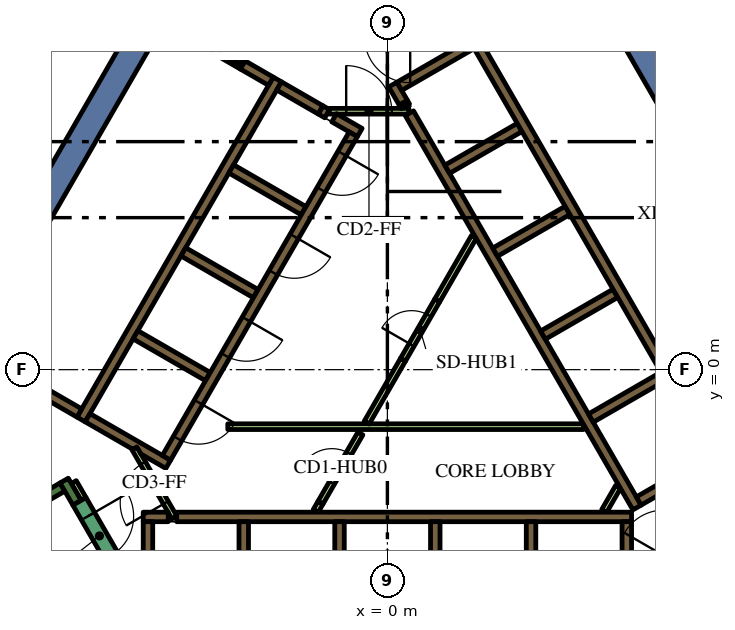
"""IFC4 building model, lengths in metres.
Left out: names, types, materials, properties, quantities, classifications, styles, units other than length and angle.
Written with IfcOpenShell. Run it as: python <this file> out.ifc"""

import sys

from ifc_helpers import new_model, si_unit, direction, frame, frame_2d, origin, place, context, subcontext, project, spatial, polyline, rectangle, outline, extrude, element, fill, save


model = new_model("IFC4")
c1 = context("Model", 3, precision=1e-05, world=origin(), true_north=direction((0.0, 1.0)))
c2 = subcontext(c1, "Body", "Model", "MODEL_VIEW")
j1 = project(units=[si_unit("LENGTHUNIT", "METRE"), si_unit("PLANEANGLEUNIT", "RADIAN")], contexts=[c1])
p1 = place(None, origin())
s1 = spatial("IfcSite", under=j1, at=p1, CompositionType="ELEMENT")
p2 = place(p1, origin())
s2 = spatial("IfcBuilding", under=s1, at=p2, CompositionType="ELEMENT")
p3 = place(p2, frame((0.0, 0.0, 252.0)))
s3 = spatial("IfcBuildingStorey", under=s2, at=p3, CompositionType="ELEMENT", Elevation=252.0)
p4 = place(p3, frame((8.235, 5.736, 0.0), z_axis=(0.0, 0.0, 1.0), x_axis=(-0.499983401189, 0.8660349869, 0.0)))
e1 = element("IfcWall", 1, at=p4, inside=s3, PredefinedType="SOLIDWALL", context=c2, shape_type="SweptSolid", body=[
    extrude(rectangle(XDim=12.472, YDim=0.7, at=frame_2d((6.236, 0.0))), origin(), (0.0, 0.0, 1.0), 4.2),
])
p5 = place(p3, frame((-12.625, -1.867, 0.0), z_axis=(0.0, 0.0, 1.0), x_axis=(0.499996974394, 0.866027150612, 0.0)))
e2 = element("IfcWall", 2, at=p5, inside=s3, PredefinedType="SOLIDWALL", context=c2, shape_type="SweptSolid", body=[
    extrude(rectangle(XDim=15.858, YDim=0.7, at=frame_2d((7.929, 0.0))), origin(), (0.0, 0.0, 1.0), 4.2),
])
p6 = place(p3, frame((-14.44, -6.49, 0.0), z_axis=(0.0, 0.0, 1.0), x_axis=(0.866022966069, 0.500004222222, 0.0)))
e3 = element("IfcWall", 3, at=p6, inside=s3, PredefinedType="SOLIDWALL", context=c2, shape_type="SweptSolid", body=[
    extrude(rectangle(XDim=6.8, YDim=0.25, at=frame_2d((3.4, 0.0))), origin(), (0.0, 0.0, 1.0), 4.2),
])
p7 = place(p3, frame((-8.168, -3.503, 0.0), z_axis=(0.0, 0.0, 1.0), x_axis=(-0.499952099219, 0.866053057547, 0.0)))
e4 = element("IfcWall", 4, at=p7, inside=s3, PredefinedType="SOLIDWALL", context=c2, shape_type="SweptSolid", body=[
    extrude(rectangle(XDim=0.675, YDim=0.25, at=frame_2d((0.337, 0.0))), origin(), (0.0, 0.0, 1.0), 4.2),
])
p8 = place(p3, frame((-5.545, -3.875, 0.0), z_axis=(0.0, 0.0, 1.0), x_axis=(1.0, 0.0, 0.0)))
e5 = element("IfcWall", 5, at=p8, inside=s3, PredefinedType="SOLIDWALL", context=c2, shape_type="SweptSolid", body=[
    extrude(rectangle(XDim=11.97, YDim=0.25, at=frame_2d((5.985, 0.0))), origin(), (0.0, 0.0, 1.0), 4.2),
])
p9 = place(p3, frame((-6.425, -3.875, 0.0), z_axis=(0.0, 0.0, 1.0), x_axis=(1.0, 0.0, 0.0)))
e6 = element("IfcWall", 6, at=p9, inside=s3, PredefinedType="SOLIDWALL", context=c2, shape_type="SweptSolid", body=[
    extrude(rectangle(XDim=0.658, YDim=0.25, at=frame_2d((0.329, 0.0))), origin(), (0.0, 0.0, 1.0), 4.2),
])
p10 = place(p3, frame((6.3, -7.24, 0.0), z_axis=(0.0, 0.0, 1.0), x_axis=(0.0, 1.0, 0.0)))
e7 = element("IfcWall", 7, at=p10, inside=s3, PredefinedType="SOLIDWALL", context=c2, shape_type="SweptSolid", body=[
    extrude(rectangle(XDim=3.24, YDim=0.25, at=frame_2d((1.62, 0.0))), origin(), (0.0, 0.0, 1.0), 4.2),
])
for number, where, z_axis, x_axis in (
    (8, (3.78, -4.0, 0.0), (0.0, 0.0, 1.0), (0.0, -1.0, 0.0)),
    (9, (1.26, -4.0, 0.0), (0.0, 0.0, 1.0), (0.0, -1.0, 0.0)),
    (10, (-1.26, -4.0, 0.0), (0.0, 0.0, 1.0), (0.0, -1.0, 0.0)),
    (11, (-3.78, -4.0, 0.0), (0.0, 0.0, 1.0), (0.0, -1.0, 0.0)),
):
    element("IfcWall", number, at=place(p3, frame(where, z_axis=z_axis, x_axis=x_axis)), inside=s3, PredefinedType="SOLIDWALL", context=c2, shape_type="SweptSolid", body=[
        extrude(rectangle(XDim=2.2, YDim=0.25, at=frame_2d((1.1, 0.0))), origin(), (0.0, 0.0, 1.0), 4.2),
    ])
p11 = place(p3, frame((-6.3, -7.125, 0.0), z_axis=(0.0, 0.0, 1.0), x_axis=(0.0, 1.0, 0.0)))
e12 = element("IfcWall", 12, at=p11, inside=s3, PredefinedType="SOLIDWALL", context=c2, shape_type="SweptSolid", body=[
    extrude(rectangle(XDim=3.125, YDim=0.25, at=frame_2d((1.562, 0.0))), origin(), (0.0, 0.0, 1.0), 4.2),
])
p12 = place(p3, frame((0.473, 6.93, 0.0), z_axis=(0.0, 0.0, 1.0), x_axis=(-0.49972245349, 0.866185586049, 0.0)))
e13 = element("IfcWall", 13, at=p12, inside=s3, PredefinedType="SOLIDWALL", context=c2, shape_type="SweptSolid", body=[
    extrude(rectangle(XDim=0.11, YDim=0.25, at=frame_2d((0.055, 0.0))), origin(), (0.0, 0.0, 1.0), 4.2),
])
p13 = place(p3, frame((6.568, -3.627, 0.0), z_axis=(0.0, 0.0, 1.0), x_axis=(-0.499999455981, 0.866025717874, 0.0)))
e14 = element("IfcWall", 14, at=p13, inside=s3, PredefinedType="SOLIDWALL", context=c2, shape_type="SweptSolid", body=[
    extrude(rectangle(XDim=11.978, YDim=0.25, at=frame_2d((5.989, 0.0))), origin(), (0.0, 0.0, 1.0), 4.2),
])
p14 = place(p3, frame((0.417, 7.027, 0.0), z_axis=(0.0, 0.0, 1.0), x_axis=(-0.500210807569, 0.865903659763, 0.0)))
e15 = element("IfcWall", 15, at=p14, inside=s3, PredefinedType="SOLIDWALL", context=c2, shape_type="SweptSolid", body=[
    extrude(rectangle(XDim=0.548, YDim=0.25, at=frame_2d((0.274, 0.0))), origin(), (0.0, 0.0, 1.0), 4.2),
])
p15 = place(p3, frame((3.1, 9.064, 0.0), z_axis=(0.0, 0.0, 1.0), x_axis=(-0.866030133475, -0.499991807846, 0.0)))
e16 = element("IfcWall", 16, at=p15, inside=s3, PredefinedType="SOLIDWALL", context=c2, shape_type="SweptSolid", body=[
    extrude(rectangle(XDim=3.217, YDim=0.25, at=frame_2d((1.608, 0.0))), origin(), (0.0, 0.0, 1.0), 4.2),
])
p16 = place(p3, frame((1.574, 5.274, 0.0), z_axis=(0.0, 0.0, 1.0), x_axis=(0.866028486751, 0.499994660107, 0.0)))
e17 = element("IfcWall", 17, at=p16, inside=s3, PredefinedType="SOLIDWALL", context=c2, shape_type="SweptSolid", body=[
    extrude(rectangle(XDim=2.2, YDim=0.25, at=frame_2d((1.1, 0.0))), origin(), (0.0, 0.0, 1.0), 4.2),
])
for number, where, z_axis, x_axis in (
    (18, (2.834, 3.091, 0.0), (0.0, 0.0, 1.0), (0.866, 0.5, 0.0)),
    (19, (4.094, 0.909, 0.0), (0.0, 0.0, 1.0), (0.866, 0.5, 0.0)),
    (20, (5.354, -1.274, 0.0), (0.0, 0.0, 1.0), (0.866, 0.5, 0.0)),
):
    element("IfcWall", number, at=place(p3, frame(where, z_axis=z_axis, x_axis=x_axis)), inside=s3, PredefinedType="SOLIDWALL", context=c2, shape_type="SweptSolid", body=[
        extrude(rectangle(XDim=2.2, YDim=0.25, at=frame_2d((1.1, 0.0))), origin(), (0.0, 0.0, 1.0), 4.2),
    ])
p17 = place(p3, frame((6.614, -3.456, 0.0), z_axis=(0.0, 0.0, 1.0), x_axis=(0.866025089694, 0.500000544019, 0.0)))
e21 = element("IfcWall", 21, at=p17, inside=s3, PredefinedType="SOLIDWALL", context=c2, shape_type="SweptSolid", body=[
    extrude(rectangle(XDim=2.305, YDim=0.25, at=frame_2d((1.153, 0.0))), origin(), (0.0, 0.0, 1.0), 4.2),
])
p18 = place(p3, frame((-8.06, -1.311, 0.0), z_axis=(0.0, 0.0, 1.0), x_axis=(0.50000273126, 0.866023826885, 0.0)))
e22 = element("IfcWall", 22, at=p18, inside=s3, PredefinedType="SOLIDWALL", context=c2, shape_type="SweptSolid", body=[
    extrude(rectangle(XDim=10.33, YDim=0.25, at=frame_2d((5.165, 0.0))), origin(), (0.0, 0.0, 1.0), 4.2),
])
p19 = place(p3, frame((-1.758, 6.835, 0.0), z_axis=(0.0, 0.0, 1.0), x_axis=(0.865982457891, -0.500074377092, 0.0)))
e23 = element("IfcWall", 23, at=p19, inside=s3, PredefinedType="SOLIDWALL", context=c2, shape_type="SweptSolid", body=[
    extrude(rectangle(XDim=0.2, YDim=0.25, at=frame_2d((0.1, 0.0))), origin(), (0.0, 0.0, 1.0), 4.2),
])
p20 = place(p3, frame((-1.76, 6.836, 0.0), z_axis=(0.0, 0.0, 1.0), x_axis=(-0.865952863304, 0.500125622755, 0.0)))
e24 = element("IfcWall", 24, at=p20, inside=s3, PredefinedType="SOLIDWALL", context=c2, shape_type="SweptSolid", body=[
    extrude(rectangle(XDim=1.258, YDim=0.25, at=frame_2d((0.629, 0.0))), origin(), (0.0, 0.0, 1.0), 4.2),
])
p21 = place(p3, frame((-0.728, 6.24, 0.0), z_axis=(0.0, 0.0, 1.0), x_axis=(-0.865955664968, 0.500120771724, 0.0)))
e25 = element("IfcWall", 25, at=p21, inside=s3, PredefinedType="SOLIDWALL", context=c2, shape_type="SweptSolid", body=[
    extrude(rectangle(XDim=0.778, YDim=0.25, at=frame_2d((0.389, 0.0))), origin(), (0.0, 0.0, 1.0), 4.2),
])
for number, where, z_axis, x_axis in (
    (26, (-2.204, 4.182, 0.0), (0.0, 0.0, 1.0), (-0.866, 0.5, 0.0)),
    (27, (-5.369, 3.1, 0.0), (0.0, 0.0, 1.0), (0.866, -0.5, 0.0)),
    (28, (-4.724, -0.182, 0.0), (0.0, 0.0, 1.0), (-0.866, 0.5, 0.0)),
):
    element("IfcWall", number, at=place(p3, frame(where, z_axis=z_axis, x_axis=x_axis)), inside=s3, PredefinedType="SOLIDWALL", context=c2, shape_type="SweptSolid", body=[
        extrude(rectangle(XDim=2.2, YDim=0.25, at=frame_2d((1.1, 0.0))), origin(), (0.0, 0.0, 1.0), 4.2),
    ])
p22 = place(p3, origin())
e29 = element("IfcWall", 29, at=p22, inside=s3, PredefinedType="SOLIDWALL", context=c2, shape_type="SweptSolid", body=[
    extrude(outline(polyline([(-5.922, -2.257), (-5.922, -2.257), (-5.705, -2.382), (-5.83, -2.598), (-6.483, -2.221), (-6.591, -2.033), (-6.591, -2.033), (-6.7, -2.096), (-7.952, -1.373), (-7.827, -1.156), (-5.922, -2.257)])), origin(), (0.0, 0.0, 1.0), 4.2),
])
p23 = place(p3, frame((-8.106, -1.14, 0.0), z_axis=(0.0, 0.0, 1.0), x_axis=(-0.866008981251, 0.500028443584, 0.0)))
e30 = element("IfcWall", 30, at=p23, inside=s3, PredefinedType="SOLIDWALL", context=c2, shape_type="SweptSolid", body=[
    extrude(rectangle(XDim=3.2, YDim=0.25, at=frame_2d((1.6, 0.0))), origin(), (0.0, 0.0, 1.0), 4.2),
])
p24 = place(p3, frame((-3.066, 7.59, 0.0), z_axis=(0.0, 0.0, 1.0), x_axis=(-0.866081358704, 0.49990307071, 0.0)))
e31 = element("IfcWall", 31, at=p24, inside=s3, PredefinedType="SOLIDWALL", context=c2, shape_type="SweptSolid", body=[
    extrude(rectangle(XDim=0.858, YDim=0.25, at=frame_2d((0.429, 0.0))), origin(), (0.0, 0.0, 1.0), 4.2),
])
e32 = element("IfcWall", 32, at=p22, inside=s3, PredefinedType="SOLIDWALL", context=c2, shape_type="SweptSolid", body=[
    extrude(outline(polyline([(-3.748, 8.128), (-3.813, 8.015), (-4.027, 8.139), (-4.017, 8.156), (-4.008, 8.173), (-4.0, 8.192), (-3.995, 8.21), (-3.991, 8.23), (-3.99, 8.25), (-3.99, 8.268), (-3.748, 8.128)])), origin(), (0.0, 0.0, 1.0), 4.2),
])
p25 = place(p3, frame((-8.252, -2.958, 0.0), z_axis=(0.0, 0.0, 1.0), x_axis=(0.500174715838, -0.865924508047, 0.0)))
e33 = element("IfcWall", 33, at=p25, inside=s3, PredefinedType="PARTITIONING", context=c2, shape_type="SweptSolid", body=[
    extrude(rectangle(XDim=0.514, YDim=0.15, at=frame_2d((0.257, 0.0))), origin(), (0.0, 0.0, 1.0), 3.4),
])
p26 = place(p3, frame((5.705, -3.718, 0.0), z_axis=(0.0, 0.0, 1.0), x_axis=(0.499962090823, 0.866047289552, 0.0)))
e34 = element("IfcWall", 34, at=p26, inside=s3, PredefinedType="PARTITIONING", context=c2, shape_type="SweptSolid", body=[
    extrude(rectangle(XDim=0.735, YDim=0.15, at=frame_2d((0.367, 0.0))), origin(), (0.0, 0.0, 1.0), 3.4),
])
p27 = place(p3, frame((-4.2, -1.5, 0.0), z_axis=(0.0, 0.0, 1.0), x_axis=(1.0, 0.0, 0.0)))
e35 = element("IfcWall", 35, at=p27, inside=s3, PredefinedType="PARTITIONING", context=c2, shape_type="SweptSolid", body=[
    extrude(rectangle(XDim=9.359, YDim=0.15, at=frame_2d((4.68, 0.0))), origin(), (0.0, 0.0, 1.0), 3.4),
])
p28 = place(p3, frame((-0.544, -1.393, 0.0), z_axis=(0.0, 0.0, 1.0), x_axis=(0.499928740635, 0.866066541489, 0.0)))
e36 = element("IfcWall", 36, at=p28, inside=s3, PredefinedType="PARTITIONING", context=c2, shape_type="SweptSolid", body=[
    extrude(rectangle(XDim=1.912, YDim=0.15, at=frame_2d((0.956, 0.0))), origin(), (0.0, 0.0, 1.0), 3.4),
])
p29 = place(p3, frame((1.312, 1.822, 0.0), z_axis=(0.0, 0.0, 1.0), x_axis=(0.500003549559, 0.866023354436, 0.0)))
e37 = element("IfcWall", 37, at=p29, inside=s3, PredefinedType="PARTITIONING", context=c2, shape_type="SweptSolid", body=[
    extrude(rectangle(XDim=1.93, YDim=0.15, at=frame_2d((0.965, 0.0))), origin(), (0.0, 0.0, 1.0), 3.4),
])
p30 = place(p3, frame((-1.887, -3.718, 0.0), z_axis=(0.0, 0.0, 1.0), x_axis=(0.500165633897, 0.865929753888, 0.0)))
e38 = element("IfcWall", 38, at=p30, inside=s3, PredefinedType="PARTITIONING", context=c2, shape_type="SweptSolid", body=[
    extrude(rectangle(XDim=0.254, YDim=0.15, at=frame_2d((0.127, 0.0))), origin(), (0.0, 0.0, 1.0), 3.4),
])
p31 = place(p3, frame((8.565, -2.185, 0.0), z_axis=(0.0, 0.0, 1.0), x_axis=(-0.499997954832, 0.866026584559, 0.0)))
e39 = element("IfcWall", 39, at=p31, inside=s3, PredefinedType="SOLIDWALL", context=c2, shape_type="SweptSolid", body=[
    extrude(rectangle(XDim=12.35, YDim=0.25, at=frame_2d((6.175, 0.0))), origin(), (0.0, 0.0, 1.0), 4.2),
])
p32 = place(p31, frame((0.585, 0.0, 0.0)))
e40 = element("IfcOpeningElement", 40, at=p32, cuts=e39, PredefinedType="OPENING", context=c2, shape_type="SweptSolid", body=[
    extrude(rectangle(XDim=1.1, YDim=2.1, at=frame_2d((0.55, 1.05))), frame((0.0, 0.135, 0.0), z_axis=(0.0, -1.0, 0.0), x_axis=(1.0, 0.0, 0.0)), (0.0, 0.0, 1.0), 0.27),
])
p33 = place(p3, frame((-0.898, 6.194, 0.0), z_axis=(0.0, 0.0, 1.0), x_axis=(-0.499996202215, -0.866027596426, 0.0)))
e41 = element("IfcWall", 41, at=p33, inside=s3, PredefinedType="SOLIDWALL", context=c2, shape_type="SweptSolid", body=[
    extrude(rectangle(XDim=9.83, YDim=0.25, at=frame_2d((4.915, 0.0))), origin(), (0.0, 0.0, 1.0), 4.2),
])
p34 = place(p33, frame((0.585, 0.0, 0.0)))
e42 = element("IfcOpeningElement", 42, at=p34, cuts=e41, PredefinedType="OPENING", context=c2, shape_type="SweptSolid", body=[
    extrude(rectangle(XDim=1.1, YDim=2.1, at=frame_2d((0.55, 1.05))), frame((0.0, 0.135, 0.0), z_axis=(0.0, -1.0, 0.0), x_axis=(1.0, 0.0, 0.0)), (0.0, 0.0, 1.0), 0.27),
])
p35 = place(p33, frame((3.105, 0.0, 0.0)))
e43 = element("IfcOpeningElement", 43, at=p35, cuts=e41, PredefinedType="OPENING", context=c2, shape_type="SweptSolid", body=[
    extrude(rectangle(XDim=1.1, YDim=2.1, at=frame_2d((0.55, 1.05))), frame((0.0, 0.135, 0.0), z_axis=(0.0, -1.0, 0.0), x_axis=(1.0, 0.0, 0.0)), (0.0, 0.0, 1.0), 0.27),
])
p36 = place(p33, frame((5.625, 0.0, 0.0)))
e44 = element("IfcOpeningElement", 44, at=p36, cuts=e41, PredefinedType="OPENING", context=c2, shape_type="SweptSolid", body=[
    extrude(rectangle(XDim=1.1, YDim=2.1, at=frame_2d((0.55, 1.05))), frame((0.0, 0.135, 0.0), z_axis=(0.0, -1.0, 0.0), x_axis=(1.0, 0.0, 0.0)), (0.0, 0.0, 1.0), 0.27),
])
p37 = place(p33, frame((8.145, 0.0, 0.0)))
e45 = element("IfcOpeningElement", 45, at=p37, cuts=e41, PredefinedType="OPENING", context=c2, shape_type="SweptSolid", body=[
    extrude(rectangle(XDim=1.1, YDim=2.1, at=frame_2d((0.55, 1.05))), frame((0.0, 0.135, 0.0), z_axis=(0.0, -1.0, 0.0), x_axis=(1.0, 0.0, 0.0)), (0.0, 0.0, 1.0), 0.27),
])
p38 = place(p3, frame((7.053, -5.284, 0.0), z_axis=(0.0, 0.0, 1.0), x_axis=(0.500078061341, 0.865980330357, 0.0)))
e46 = element("IfcWall", 46, at=p38, inside=s3, PredefinedType="SOLIDWALL", context=c2, shape_type="SweptSolid", body=[
    extrude(rectangle(XDim=2.1, YDim=0.4, at=frame_2d((1.05, 0.0))), origin(), (0.0, 0.0, 1.0), 4.2),
])
p39 = place(p38, frame((0.45, 0.0, 0.0)))
e47 = element("IfcOpeningElement", 47, at=p39, cuts=e46, PredefinedType="OPENING", context=c2, shape_type="SweptSolid", body=[
    extrude(rectangle(XDim=1.2, YDim=2.1, at=frame_2d((0.6, 1.05))), frame((0.0, 0.21, 0.0), z_axis=(0.0, -1.0, 0.0), x_axis=(1.0, 0.0, 0.0)), (0.0, 0.0, 1.0), 0.42),
])
p40 = place(p3, frame((-8.103, -3.466, 0.0), z_axis=(0.0, 0.0, 1.0), x_axis=(0.500078061341, -0.865980330357, 0.0)))
e48 = element("IfcWall", 48, at=p40, inside=s3, PredefinedType="SOLIDWALL", context=c2, shape_type="SweptSolid", body=[
    extrude(rectangle(XDim=2.1, YDim=0.4, at=frame_2d((1.05, 0.0))), origin(), (0.0, 0.0, 1.0), 4.2),
])
p41 = place(p40, frame((0.45, 0.0, 0.0)))
e49 = element("IfcOpeningElement", 49, at=p41, cuts=e48, PredefinedType="OPENING", context=c2, shape_type="SweptSolid", body=[
    extrude(rectangle(XDim=1.2, YDim=2.1, at=frame_2d((0.6, 1.05))), frame((0.0, 0.21, 0.0), z_axis=(0.0, -1.0, 0.0), x_axis=(1.0, 0.0, 0.0)), (0.0, 0.0, 1.0), 0.42),
])
p42 = place(p3, frame((-1.76, -3.498, 0.0), z_axis=(0.0, 0.0, 1.0), x_axis=(0.499977374825, 0.866038466041, 0.0)))
e50 = element("IfcWall", 50, at=p42, inside=s3, PredefinedType="PARTITIONING", context=c2, shape_type="SweptSolid", body=[
    extrude(rectangle(XDim=2.1, YDim=0.15, at=frame_2d((1.05, 0.0))), origin(), (0.0, 0.0, 1.0), 3.4),
])
p43 = place(p42, frame((0.6, 0.0, 0.0)))
e51 = element("IfcOpeningElement", 51, at=p43, cuts=e50, PredefinedType="OPENING", context=c2, shape_type="SweptSolid", body=[
    extrude(rectangle(XDim=0.9, YDim=2.1, at=frame_2d((0.45, 1.05))), frame((0.0, 0.085, 0.0), z_axis=(0.0, -1.0, 0.0), x_axis=(1.0, 0.0, 0.0)), (0.0, 0.0, 1.0), 0.17),
])
p44 = place(p3, frame((-1.534, 6.8, 0.0), z_axis=(0.0, 0.0, 1.0), x_axis=(1.0, 0.0, 0.0)))
e52 = element("IfcWall", 52, at=p44, inside=s3, PredefinedType="PARTITIONING", context=c2, shape_type="SweptSolid", body=[
    extrude(rectangle(XDim=2.1, YDim=0.15, at=frame_2d((1.05, 0.0))), origin(), (0.0, 0.0, 1.0), 3.4),
])
p45 = place(p44, frame((0.45, 0.0, 0.0)))
e53 = element("IfcOpeningElement", 53, at=p45, cuts=e52, PredefinedType="OPENING", context=c2, shape_type="SweptSolid", body=[
    extrude(rectangle(XDim=1.2, YDim=2.1, at=frame_2d((0.6, 1.05))), frame((0.0, 0.085, 0.0), z_axis=(0.0, -1.0, 0.0), x_axis=(1.0, 0.0, 0.0)), (0.0, 0.0, 1.0), 0.17),
])
p46 = place(p3, frame((-5.606, -3.89, 0.0), z_axis=(0.0, 0.0, 1.0), x_axis=(-0.500027713859, 0.866009402589, 0.0)))
e54 = element("IfcWall", 54, at=p46, inside=s3, PredefinedType="PARTITIONING", context=c2, shape_type="SweptSolid", body=[
    extrude(rectangle(XDim=2.1, YDim=0.15, at=frame_2d((1.05, 0.0))), origin(), (0.0, 0.0, 1.0), 3.4),
])
p47 = place(p46, frame((0.45, 0.0, 0.0)))
e55 = element("IfcOpeningElement", 55, at=p47, cuts=e54, PredefinedType="OPENING", context=c2, shape_type="SweptSolid", body=[
    extrude(rectangle(XDim=1.2, YDim=2.1, at=frame_2d((0.6, 1.05))), frame((0.0, 0.085, 0.0), z_axis=(0.0, -1.0, 0.0), x_axis=(1.0, 0.0, 0.0)), (0.0, 0.0, 1.0), 0.17),
])
p48 = place(p3, frame((-5.659, 9.012, 0.0), z_axis=(0.0, 0.0, 1.0), x_axis=(0.866009402589, -0.500027713859, 0.0)))
e56 = element("IfcWall", 56, at=p48, inside=s3, PredefinedType="PARTITIONING", context=c2, shape_type="SweptSolid", body=[
    extrude(rectangle(XDim=2.1, YDim=0.12, at=frame_2d((1.05, 0.0))), origin(), (0.0, 0.0, 1.0), 3.4),
])
p49 = place(p48, frame((0.45, 0.0, 0.0)))
e57 = element("IfcOpeningElement", 57, at=p49, cuts=e56, PredefinedType="OPENING", context=c2, shape_type="SweptSolid", body=[
    extrude(rectangle(XDim=1.2, YDim=2.1, at=frame_2d((0.6, 1.05))), frame((0.0, 0.07, 0.0), z_axis=(0.0, -1.0, 0.0), x_axis=(1.0, 0.0, 0.0)), (0.0, 0.0, 1.0), 0.14),
])
p50 = place(p3, frame((0.412, 0.263, 0.0), z_axis=(0.0, 0.0, 1.0), x_axis=(0.500062916607, 0.865989075817, 0.0)))
e58 = element("IfcWall", 58, at=p50, inside=s3, PredefinedType="PARTITIONING", context=c2, shape_type="SweptSolid", body=[
    extrude(rectangle(XDim=1.8, YDim=0.15, at=frame_2d((0.9, 0.0))), origin(), (0.0, 0.0, 1.0), 3.4),
])
p51 = place(p50, frame((0.45, 0.0, 0.0)))
e59 = element("IfcOpeningElement", 59, at=p51, cuts=e58, PredefinedType="OPENING", context=c2, shape_type="SweptSolid", body=[
    extrude(rectangle(XDim=0.9, YDim=2.1, at=frame_2d((0.45, 1.05))), frame((0.0, 0.085, 0.0), z_axis=(0.0, -1.0, 0.0), x_axis=(1.0, 0.0, 0.0)), (0.0, 0.0, 1.0), 0.17),
])
p52 = place(p34, origin())
e60 = element("IfcDoor", 60, at=p52, inside=s3, OperationType="DOUBLE_DOOR_SLIDING", PredefinedType="DOOR", context=c2, shape_type="SweptSolid", body=[
    extrude(rectangle(XDim=1.1, YDim=2.1, at=frame_2d((0.55, 1.05))), frame((0.0, 0.025, 0.0), z_axis=(0.0, -1.0, 0.0), x_axis=(1.0, 0.0, 0.0)), (0.0, 0.0, 1.0), 0.05),
])
fill(e42, e60)
p53 = place(p35, origin())
e61 = element("IfcDoor", 61, at=p53, inside=s3, OperationType="DOUBLE_DOOR_SLIDING", PredefinedType="DOOR", context=c2, shape_type="SweptSolid", body=[
    extrude(rectangle(XDim=1.1, YDim=2.1, at=frame_2d((0.55, 1.05))), frame((0.0, 0.025, 0.0), z_axis=(0.0, -1.0, 0.0), x_axis=(1.0, 0.0, 0.0)), (0.0, 0.0, 1.0), 0.05),
])
fill(e43, e61)
p54 = place(p36, origin())
e62 = element("IfcDoor", 62, at=p54, inside=s3, OperationType="DOUBLE_DOOR_SLIDING", PredefinedType="DOOR", context=c2, shape_type="SweptSolid", body=[
    extrude(rectangle(XDim=1.1, YDim=2.1, at=frame_2d((0.55, 1.05))), frame((0.0, 0.025, 0.0), z_axis=(0.0, -1.0, 0.0), x_axis=(1.0, 0.0, 0.0)), (0.0, 0.0, 1.0), 0.05),
])
fill(e44, e62)
p55 = place(p37, origin())
e63 = element("IfcDoor", 63, at=p55, inside=s3, OperationType="DOUBLE_DOOR_SLIDING", PredefinedType="DOOR", context=c2, shape_type="SweptSolid", body=[
    extrude(rectangle(XDim=1.1, YDim=2.1, at=frame_2d((0.55, 1.05))), frame((0.0, 0.025, 0.0), z_axis=(0.0, -1.0, 0.0), x_axis=(1.0, 0.0, 0.0)), (0.0, 0.0, 1.0), 0.05),
])
fill(e45, e63)
p56 = place(p41, origin())
e64 = element("IfcDoor", 64, at=p56, inside=s3, OperationType="SINGLE_SWING_LEFT", PredefinedType="DOOR", context=c2, shape_type="SweptSolid", body=[
    extrude(rectangle(XDim=1.2, YDim=2.1, at=frame_2d((0.6, 1.05))), frame((0.0, 0.025, 0.0), z_axis=(0.0, -1.0, 0.0), x_axis=(1.0, 0.0, 0.0)), (0.0, 0.0, 1.0), 0.05),
])
fill(e49, e64)
p57 = place(p43, origin())
e65 = element("IfcDoor", 65, at=p57, inside=s3, OperationType="SINGLE_SWING_LEFT", PredefinedType="DOOR", context=c2, shape_type="SweptSolid", body=[
    extrude(rectangle(XDim=0.9, YDim=2.1, at=frame_2d((0.45, 1.05))), frame((0.0, 0.025, 0.0), z_axis=(0.0, -1.0, 0.0), x_axis=(1.0, 0.0, 0.0)), (0.0, 0.0, 1.0), 0.05),
])
fill(e51, e65)
p58 = place(p45, origin())
e66 = element("IfcDoor", 66, at=p58, inside=s3, OperationType="SINGLE_SWING_LEFT", PredefinedType="DOOR", context=c2, shape_type="SweptSolid", body=[
    extrude(rectangle(XDim=1.2, YDim=2.1, at=frame_2d((0.6, 1.05))), frame((0.0, 0.025, 0.0), z_axis=(0.0, -1.0, 0.0), x_axis=(1.0, 0.0, 0.0)), (0.0, 0.0, 1.0), 0.05),
])
fill(e53, e66)
p59 = place(p47, origin())
e67 = element("IfcDoor", 67, at=p59, inside=s3, OperationType="SINGLE_SWING_LEFT", PredefinedType="DOOR", context=c2, shape_type="SweptSolid", body=[
    extrude(rectangle(XDim=1.2, YDim=2.1, at=frame_2d((0.6, 1.05))), frame((0.0, 0.025, 0.0), z_axis=(0.0, -1.0, 0.0), x_axis=(1.0, 0.0, 0.0)), (0.0, 0.0, 1.0), 0.05),
])
fill(e55, e67)
p60 = place(p49, origin())
e68 = element("IfcDoor", 68, at=p60, inside=s3, OperationType="SINGLE_SWING_LEFT", PredefinedType="DOOR", context=c2, shape_type="SweptSolid", body=[
    extrude(rectangle(XDim=1.2, YDim=2.1, at=frame_2d((0.6, 1.05))), frame((0.0, 0.025, 0.0), z_axis=(0.0, -1.0, 0.0), x_axis=(1.0, 0.0, 0.0)), (0.0, 0.0, 1.0), 0.05),
])
fill(e57, e68)
p61 = place(p51, origin())
e69 = element("IfcDoor", 69, at=p61, inside=s3, OperationType="SINGLE_SWING_LEFT", PredefinedType="DOOR", context=c2, shape_type="SweptSolid", body=[
    extrude(rectangle(XDim=0.9, YDim=2.1, at=frame_2d((0.45, 1.05))), frame((0.0, 0.025, 0.0), z_axis=(0.0, -1.0, 0.0), x_axis=(1.0, 0.0, 0.0)), (0.0, 0.0, 1.0), 0.05),
])
fill(e59, e69)
save(model, sys.argv[1])
